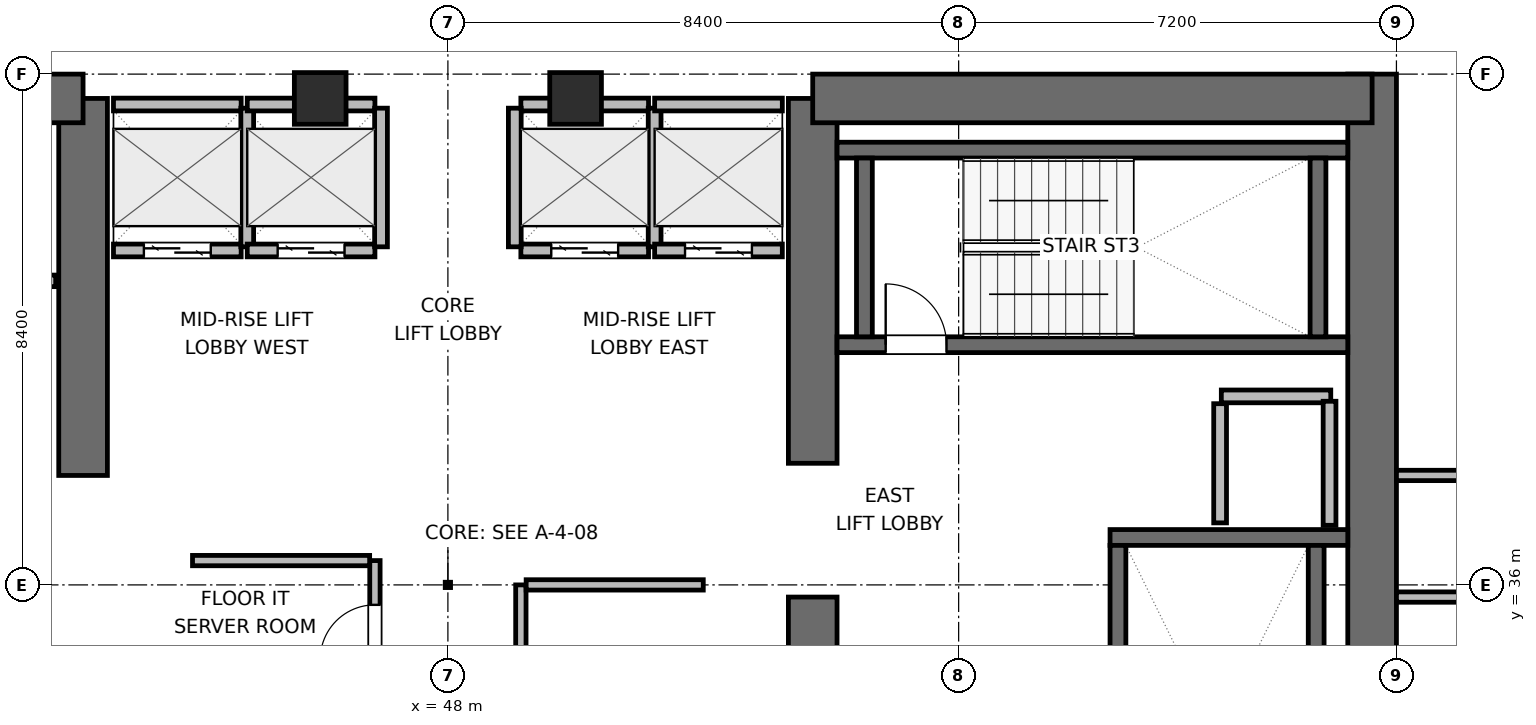
"""IFC4 building model, lengths in metres.
Left out: names, types, materials, properties, quantities, classifications, styles, units other than length and angle.
Written with IfcOpenShell. Run it as: python <this file> out.ifc"""

import sys

from ifc_helpers import new_model, si_unit, direction, frame, frame_2d, origin, origin_2d, place, context, subcontext, project, spatial, rectangle, extrude, element, fill, save


model = new_model("IFC4")
c1 = context("Model", 3, precision=1e-05, world=origin(), true_north=direction((0.0, 1.0)))
c2 = subcontext(c1, "Body", "Model", "MODEL_VIEW")
j1 = project(units=[si_unit("LENGTHUNIT", "METRE"), si_unit("PLANEANGLEUNIT", "RADIAN")], contexts=[c1])
p1 = place(None, origin())
s1 = spatial("IfcSite", under=j1, at=p1, CompositionType="ELEMENT")
p2 = place(p1, origin())
s2 = spatial("IfcBuilding", under=s1, at=p2, CompositionType="ELEMENT")
p3 = place(p2, frame((0.0, 0.0, 166.2)))
s3 = spatial("IfcBuildingStorey", under=s2, at=p3, CompositionType="ELEMENT", Elevation=166.2)
p4 = place(p3, frame((42.0, 37.8, 0.0), z_axis=(0.0, 0.0, 1.0), x_axis=(0.0, 1.0, 0.0)))
e1 = element("IfcWall", 1, at=p4, inside=s3, PredefinedType="SHEAR", context=c2, shape_type="SweptSolid", body=[
    extrude(rectangle(XDim=6.2, YDim=0.8, at=frame_2d((3.1, 0.0))), origin(), (0.0, 0.0, 1.0), 3.9),
])
p5 = place(p3, frame((32.8, 44.0, 0.0), z_axis=(0.0, 0.0, 1.0), x_axis=(1.0, 0.0, 0.0)))
e2 = element("IfcWall", 2, at=p5, inside=s3, PredefinedType="SHEAR", context=c2, shape_type="SweptSolid", body=[
    extrude(rectangle(XDim=9.2, YDim=0.8, at=frame_2d((4.6, 0.0))), origin(), (0.0, 0.0, 1.0), 3.9),
])
p6 = place(p5, frame((1.025, 0.0, 0.0)))
e3 = element("IfcOpeningElement", 3, at=p6, cuts=e2, PredefinedType="OPENING", context=c2, shape_type="SweptSolid", body=[
    extrude(rectangle(XDim=0.95, YDim=2.04, at=frame_2d((0.475, 1.02))), frame((0.0, 0.41, 0.0), z_axis=(0.0, -1.0, 0.0), x_axis=(1.0, 0.0, 0.0)), (0.0, 0.0, 1.0), 0.82),
])
p7 = place(p5, frame((4.275, 0.0, 0.0)))
e4 = element("IfcOpeningElement", 4, at=p7, cuts=e2, PredefinedType="OPENING", context=c2, shape_type="SweptSolid", body=[
    extrude(rectangle(XDim=0.9, YDim=2.02, at=frame_2d((0.45, 1.01))), frame((0.0, 0.41, 0.0), z_axis=(0.0, -1.0, 0.0), x_axis=(1.0, 0.0, 0.0)), (0.0, 0.0, 1.0), 0.82),
])
p8 = place(p5, frame((7.175, 0.0, 0.0)))
e5 = element("IfcOpeningElement", 5, at=p8, cuts=e2, PredefinedType="OPENING", context=c2, shape_type="SweptSolid", body=[
    extrude(rectangle(XDim=0.9, YDim=2.02, at=frame_2d((0.45, 1.01))), frame((0.0, 0.41, 0.0), z_axis=(0.0, -1.0, 0.0), x_axis=(1.0, 0.0, 0.0)), (0.0, 0.0, 1.0), 0.82),
])
p9 = place(p3, frame((54.0, 28.0, 0.0), z_axis=(0.0, 0.0, 1.0), x_axis=(0.0, 1.0, 0.0)))
e6 = element("IfcWall", 6, at=p9, inside=s3, PredefinedType="SHEAR", context=c2, shape_type="SweptSolid", body=[
    extrude(rectangle(XDim=7.8, YDim=0.8, at=frame_2d((3.9, 0.0))), origin(), (0.0, 0.0, 1.0), 3.9),
])
p10 = place(p3, frame((54.0, 38.0, 0.0), z_axis=(0.0, 0.0, 1.0), x_axis=(0.0, 1.0, 0.0)))
e7 = element("IfcWall", 7, at=p10, inside=s3, PredefinedType="SHEAR", context=c2, shape_type="SweptSolid", body=[
    extrude(rectangle(XDim=6.0, YDim=0.8, at=frame_2d((3.0, 0.0))), origin(), (0.0, 0.0, 1.0), 3.9),
])
p11 = place(p3, frame((63.2, 27.6, 0.0), z_axis=(0.0, 0.0, 1.0), x_axis=(0.0, 1.0, 0.0)))
e8 = element("IfcWall", 8, at=p11, inside=s3, PredefinedType="SHEAR", context=c2, shape_type="SweptSolid", body=[
    extrude(rectangle(XDim=16.8, YDim=0.8, at=frame_2d((8.4, 0.0))), origin(), (0.0, 0.0, 1.0), 3.9),
])
p12 = place(p3, frame((54.0, 44.0, 0.0), z_axis=(0.0, 0.0, 1.0), x_axis=(1.0, 0.0, 0.0)))
e9 = element("IfcWall", 9, at=p12, inside=s3, PredefinedType="SHEAR", context=c2, shape_type="SweptSolid", body=[
    extrude(rectangle(XDim=9.2, YDim=0.8, at=frame_2d((4.6, 0.0))), origin(), (0.0, 0.0, 1.0), 3.9),
])
p13 = place(p3, frame((58.89, 36.78, 0.0), z_axis=(0.0, 0.0, 1.0), x_axis=(1.0, 0.0, 0.0)))
e10 = element("IfcWall", 10, at=p13, inside=s3, PredefinedType="SHEAR", context=c2, shape_type="SweptSolid", body=[
    extrude(rectangle(XDim=3.91, YDim=0.26, at=frame_2d((1.955, 0.0))), origin(), (0.0, 0.0, 1.0), 3.9),
])
p14 = place(p3, frame((59.02, 29.05, 0.0), z_axis=(0.0, 0.0, 1.0), x_axis=(0.0, 1.0, 0.0)))
e11 = element("IfcWall", 11, at=p14, inside=s3, PredefinedType="SHEAR", context=c2, shape_type="SweptSolid", body=[
    extrude(rectangle(XDim=7.6, YDim=0.26, at=frame_2d((3.8, 0.0))), origin(), (0.0, 0.0, 1.0), 3.9),
])
p15 = place(p14, frame((0.3, 0.0, 0.0)))
e12 = element("IfcOpeningElement", 12, at=p15, cuts=e11, PredefinedType="OPENING", context=c2, shape_type="SweptSolid", body=[
    extrude(rectangle(XDim=1.0, YDim=2.04, at=frame_2d((0.5, 1.02))), frame((0.0, 0.14, 0.0), z_axis=(0.0, -1.0, 0.0), x_axis=(1.0, 0.0, 0.0)), (0.0, 0.0, 1.0), 0.28),
])
p16 = place(p3, frame((62.28, 29.05, 0.0), z_axis=(0.0, 0.0, 1.0), x_axis=(0.0, 1.0, 0.0)))
e13 = element("IfcWall", 13, at=p16, inside=s3, PredefinedType="SHEAR", context=c2, shape_type="SweptSolid", body=[
    extrude(rectangle(XDim=7.6, YDim=0.26, at=frame_2d((3.8, 0.0))), origin(), (0.0, 0.0, 1.0), 3.9),
])
p17 = place(p3, frame((54.4, 39.95, 0.0), z_axis=(0.0, 0.0, 1.0), x_axis=(1.0, 0.0, 0.0)))
e14 = element("IfcWall", 14, at=p17, inside=s3, PredefinedType="SHEAR", context=c2, shape_type="SweptSolid", body=[
    extrude(rectangle(XDim=8.4, YDim=0.26, at=frame_2d((4.2, 0.0))), origin(), (0.0, 0.0, 1.0), 3.9),
])
p18 = place(p17, frame((0.8, 0.0, 0.0)))
e15 = element("IfcOpeningElement", 15, at=p18, cuts=e14, PredefinedType="OPENING", context=c2, shape_type="SweptSolid", body=[
    extrude(rectangle(XDim=1.0, YDim=2.04, at=frame_2d((0.5, 1.02))), frame((0.0, 0.14, 0.0), z_axis=(0.0, -1.0, 0.0), x_axis=(1.0, 0.0, 0.0)), (0.0, 0.0, 1.0), 0.28),
])
p19 = place(p3, frame((54.4, 43.15, 0.0), z_axis=(0.0, 0.0, 1.0), x_axis=(1.0, 0.0, 0.0)))
e16 = element("IfcWall", 16, at=p19, inside=s3, PredefinedType="SHEAR", context=c2, shape_type="SweptSolid", body=[
    extrude(rectangle(XDim=8.4, YDim=0.26, at=frame_2d((4.2, 0.0))), origin(), (0.0, 0.0, 1.0), 3.9),
])
for number, where, z_axis, x_axis in (
    (17, (54.85, 40.08, 0.0), (0.0, 0.0, 1.0), (0.0, 1.0, 0.0)),
    (18, (62.31, 40.08, 0.0), (0.0, 0.0, 1.0), (0.0, 1.0, 0.0)),
):
    element("IfcWall", number, at=place(p3, frame(where, z_axis=z_axis, x_axis=x_axis)), inside=s3, PredefinedType="SHEAR", context=c2, shape_type="SweptSolid", body=[
        extrude(rectangle(XDim=2.94, YDim=0.26, at=frame_2d((1.47, 0.0))), origin(), (0.0, 0.0, 1.0), 3.9),
    ])
for number, where, z_axis, x_axis in (
    (19, (45.9, 44.0, 0.0), (0.0, 0.0, 1.0), (1.0, 0.0, 0.0)),
    (20, (50.1, 44.0, 0.0), (0.0, 0.0, 1.0), (1.0, 0.0, 0.0)),
):
    element("IfcColumn", number, at=place(p3, frame(where, z_axis=z_axis, x_axis=x_axis)), inside=s3, PredefinedType="COLUMN", context=c2, shape_type="SweptSolid", body=[
        extrude(rectangle(XDim=0.85, YDim=0.85, at=origin_2d()), origin(), (0.0, 0.0, 1.0), 3.9),
    ])
p20 = place(p3, frame((33.25, 41.0, 0.0), z_axis=(0.0, 0.0, 1.0), x_axis=(1.0, 0.0, 0.0)))
e21 = element("IfcWall", 21, at=p20, inside=s3, PredefinedType="PLUMBINGWALL", context=c2, shape_type="SweptSolid", body=[
    extrude(rectangle(XDim=8.3, YDim=0.19, at=frame_2d((4.15, 0.0))), origin(), (0.0, 0.0, 1.0), 3.68),
])
p21 = place(p3, frame((60.72, 39.1, 0.0), z_axis=(0.0, 0.0, 1.0), x_axis=(1.0, 0.0, 0.0)))
e22 = element("IfcWall", 22, at=p21, inside=s3, PredefinedType="PARTITIONING", context=c2, shape_type="SweptSolid", body=[
    extrude(rectangle(XDim=1.8, YDim=0.21, at=frame_2d((0.9, 0.0))), origin(), (0.0, 0.0, 1.0), 3.68),
])
p22 = place(p3, frame((60.7, 37.02, 0.0), z_axis=(0.0, 0.0, 1.0), x_axis=(0.0, 1.0, 0.0)))
e23 = element("IfcWall", 23, at=p22, inside=s3, PredefinedType="PARTITIONING", context=c2, shape_type="SweptSolid", body=[
    extrude(rectangle(XDim=1.96, YDim=0.21, at=frame_2d((0.98, 0.0))), origin(), (0.0, 0.0, 1.0), 3.68),
])
p23 = place(p3, frame((62.5, 36.98, 0.0), z_axis=(0.0, 0.0, 1.0), x_axis=(0.0, 1.0, 0.0)))
e24 = element("IfcWall", 24, at=p23, inside=s3, PredefinedType="PARTITIONING", context=c2, shape_type="SweptSolid", body=[
    extrude(rectangle(XDim=2.04, YDim=0.21, at=frame_2d((1.02, 0.0))), origin(), (0.0, 0.0, 1.0), 3.68),
])
p24 = place(p3, frame((42.5, 41.5, 0.0), z_axis=(0.0, 0.0, 1.0), x_axis=(1.0, 0.0, 0.0)))
e25 = element("IfcWall", 25, at=p24, inside=s3, PredefinedType="PARTITIONING", context=c2, shape_type="SweptSolid", body=[
    extrude(rectangle(XDim=2.1, YDim=0.21, at=frame_2d((1.05, 0.0))), origin(), (0.0, 0.0, 1.0), 3.68),
])
p25 = place(p24, frame((0.5, 0.0, 0.0)))
e26 = element("IfcOpeningElement", 26, at=p25, cuts=e25, PredefinedType="OPENING", context=c2, shape_type="SweptSolid", body=[
    extrude(rectangle(XDim=1.1, YDim=2.04, at=frame_2d((0.55, 1.02))), frame((0.0, 0.115, 0.0), z_axis=(0.0, -1.0, 0.0), x_axis=(1.0, 0.0, 0.0)), (0.0, 0.0, 1.0), 0.23),
])
p26 = place(p3, frame((42.5, 43.9, 0.0), z_axis=(0.0, 0.0, 1.0), x_axis=(1.0, 0.0, 0.0)))
e27 = element("IfcWall", 27, at=p26, inside=s3, PredefinedType="PARTITIONING", context=c2, shape_type="SweptSolid", body=[
    extrude(rectangle(XDim=2.1, YDim=0.21, at=frame_2d((1.05, 0.0))), origin(), (0.0, 0.0, 1.0), 2.765),
])
p27 = place(p3, frame((44.7, 41.56, 0.0), z_axis=(0.0, 0.0, 1.0), x_axis=(0.0, 1.0, 0.0)))
e28 = element("IfcWall", 28, at=p27, inside=s3, PredefinedType="PARTITIONING", context=c2, shape_type="SweptSolid", body=[
    extrude(rectangle(XDim=2.28, YDim=0.21, at=frame_2d((1.14, 0.0))), origin(), (0.0, 0.0, 1.0), 3.68),
])
p28 = place(p3, frame((44.7, 41.5, 0.0), z_axis=(0.0, 0.0, 1.0), x_axis=(1.0, 0.0, 0.0)))
e29 = element("IfcWall", 29, at=p28, inside=s3, PredefinedType="PARTITIONING", context=c2, shape_type="SweptSolid", body=[
    extrude(rectangle(XDim=2.1, YDim=0.21, at=frame_2d((1.05, 0.0))), origin(), (0.0, 0.0, 1.0), 3.68),
])
p29 = place(p28, frame((0.5, 0.0, 0.0)))
e30 = element("IfcOpeningElement", 30, at=p29, cuts=e29, PredefinedType="OPENING", context=c2, shape_type="SweptSolid", body=[
    extrude(rectangle(XDim=1.1, YDim=2.04, at=frame_2d((0.55, 1.02))), frame((0.0, 0.115, 0.0), z_axis=(0.0, -1.0, 0.0), x_axis=(1.0, 0.0, 0.0)), (0.0, 0.0, 1.0), 0.23),
])
p30 = place(p3, frame((44.7, 43.9, 0.0), z_axis=(0.0, 0.0, 1.0), x_axis=(1.0, 0.0, 0.0)))
e31 = element("IfcWall", 31, at=p30, inside=s3, PredefinedType="PARTITIONING", context=c2, shape_type="SweptSolid", body=[
    extrude(rectangle(XDim=2.1, YDim=0.21, at=frame_2d((1.05, 0.0))), origin(), (0.0, 0.0, 1.0), 2.765),
])
p31 = place(p3, frame((46.9, 41.56, 0.0), z_axis=(0.0, 0.0, 1.0), x_axis=(0.0, 1.0, 0.0)))
e32 = element("IfcWall", 32, at=p31, inside=s3, PredefinedType="PARTITIONING", context=c2, shape_type="SweptSolid", body=[
    extrude(rectangle(XDim=2.28, YDim=0.21, at=frame_2d((1.14, 0.0))), origin(), (0.0, 0.0, 1.0), 3.68),
])
p32 = place(p3, frame((49.2, 41.5, 0.0), z_axis=(0.0, 0.0, 1.0), x_axis=(1.0, 0.0, 0.0)))
e33 = element("IfcWall", 33, at=p32, inside=s3, PredefinedType="PARTITIONING", context=c2, shape_type="SweptSolid", body=[
    extrude(rectangle(XDim=2.1, YDim=0.21, at=frame_2d((1.05, 0.0))), origin(), (0.0, 0.0, 1.0), 3.68),
])
p33 = place(p32, frame((0.5, 0.0, 0.0)))
e34 = element("IfcOpeningElement", 34, at=p33, cuts=e33, PredefinedType="OPENING", context=c2, shape_type="SweptSolid", body=[
    extrude(rectangle(XDim=1.1, YDim=2.04, at=frame_2d((0.55, 1.02))), frame((0.0, 0.115, 0.0), z_axis=(0.0, -1.0, 0.0), x_axis=(1.0, 0.0, 0.0)), (0.0, 0.0, 1.0), 0.23),
])
p34 = place(p3, frame((49.2, 43.9, 0.0), z_axis=(0.0, 0.0, 1.0), x_axis=(1.0, 0.0, 0.0)))
e35 = element("IfcWall", 35, at=p34, inside=s3, PredefinedType="PARTITIONING", context=c2, shape_type="SweptSolid", body=[
    extrude(rectangle(XDim=2.1, YDim=0.21, at=frame_2d((1.05, 0.0))), origin(), (0.0, 0.0, 1.0), 2.765),
])
for number, where, z_axis, x_axis in (
    (36, (49.1, 41.56, 0.0), (0.0, 0.0, 1.0), (0.0, 1.0, 0.0)),
    (37, (51.4, 41.56, 0.0), (0.0, 0.0, 1.0), (0.0, 1.0, 0.0)),
):
    element("IfcWall", number, at=place(p3, frame(where, z_axis=z_axis, x_axis=x_axis)), inside=s3, PredefinedType="PARTITIONING", context=c2, shape_type="SweptSolid", body=[
        extrude(rectangle(XDim=2.28, YDim=0.21, at=frame_2d((1.14, 0.0))), origin(), (0.0, 0.0, 1.0), 3.68),
    ])
p35 = place(p3, frame((51.4, 41.5, 0.0), z_axis=(0.0, 0.0, 1.0), x_axis=(1.0, 0.0, 0.0)))
e38 = element("IfcWall", 38, at=p35, inside=s3, PredefinedType="PARTITIONING", context=c2, shape_type="SweptSolid", body=[
    extrude(rectangle(XDim=2.1, YDim=0.21, at=frame_2d((1.05, 0.0))), origin(), (0.0, 0.0, 1.0), 3.68),
])
p36 = place(p35, frame((0.5, 0.0, 0.0)))
e39 = element("IfcOpeningElement", 39, at=p36, cuts=e38, PredefinedType="OPENING", context=c2, shape_type="SweptSolid", body=[
    extrude(rectangle(XDim=1.1, YDim=2.04, at=frame_2d((0.55, 1.02))), frame((0.0, 0.115, 0.0), z_axis=(0.0, -1.0, 0.0), x_axis=(1.0, 0.0, 0.0)), (0.0, 0.0, 1.0), 0.23),
])
p37 = place(p3, frame((51.4, 43.9, 0.0), z_axis=(0.0, 0.0, 1.0), x_axis=(1.0, 0.0, 0.0)))
e40 = element("IfcWall", 40, at=p37, inside=s3, PredefinedType="PARTITIONING", context=c2, shape_type="SweptSolid", body=[
    extrude(rectangle(XDim=2.1, YDim=0.21, at=frame_2d((1.05, 0.0))), origin(), (0.0, 0.0, 1.0), 2.765),
])
p38 = place(p3, frame((46.8, 32.6, 0.0), z_axis=(0.0, 0.0, 1.0), x_axis=(0.0, 1.0, 0.0)))
e41 = element("IfcWall", 41, at=p38, inside=s3, PredefinedType="PARTITIONING", context=c2, shape_type="SweptSolid", body=[
    extrude(rectangle(XDim=3.8, YDim=0.17, at=frame_2d((1.9, 0.0))), origin(), (0.0, 0.0, 1.0), 3.68),
])
p39 = place(p38, frame((0.272, 0.0, 0.0)))
e42 = element("IfcOpeningElement", 42, at=p39, cuts=e41, PredefinedType="OPENING", context=c2, shape_type="SweptSolid", body=[
    extrude(rectangle(XDim=0.9, YDim=2.02, at=frame_2d((0.45, 1.01))), frame((0.0, 0.095, 0.0), z_axis=(0.0, -1.0, 0.0), x_axis=(1.0, 0.0, 0.0)), (0.0, 0.0, 1.0), 0.19),
])
p40 = place(p38, frame((2.172, 0.0, 0.0)))
e43 = element("IfcOpeningElement", 43, at=p40, cuts=e41, PredefinedType="OPENING", context=c2, shape_type="SweptSolid", body=[
    extrude(rectangle(XDim=0.9, YDim=2.02, at=frame_2d((0.45, 1.01))), frame((0.0, 0.095, 0.0), z_axis=(0.0, -1.0, 0.0), x_axis=(1.0, 0.0, 0.0)), (0.0, 0.0, 1.0), 0.19),
])
p41 = place(p3, frame((43.8, 36.4, 0.0), z_axis=(0.0, 0.0, 1.0), x_axis=(1.0, 0.0, 0.0)))
e44 = element("IfcWall", 44, at=p41, inside=s3, PredefinedType="PARTITIONING", context=c2, shape_type="SweptSolid", body=[
    extrude(rectangle(XDim=2.913, YDim=0.17, at=frame_2d((1.457, 0.0))), origin(), (0.0, 0.0, 1.0), 3.68),
])
p42 = place(p3, frame((49.2, 32.6, 0.0), z_axis=(0.0, 0.0, 1.0), x_axis=(0.0, 1.0, 0.0)))
e45 = element("IfcWall", 45, at=p42, inside=s3, PredefinedType="PARTITIONING", context=c2, shape_type="SweptSolid", body=[
    extrude(rectangle(XDim=3.4, YDim=0.17, at=frame_2d((1.7, 0.0))), origin(), (0.0, 0.0, 1.0), 3.68),
])
p43 = place(p42, frame((0.638, 0.0, 0.0)))
e46 = element("IfcOpeningElement", 46, at=p43, cuts=e45, PredefinedType="OPENING", context=c2, shape_type="SweptSolid", body=[
    extrude(rectangle(XDim=0.9, YDim=2.02, at=frame_2d((0.45, 1.01))), frame((0.0, 0.095, 0.0), z_axis=(0.0, -1.0, 0.0), x_axis=(1.0, 0.0, 0.0)), (0.0, 0.0, 1.0), 0.19),
])
p44 = place(p3, frame((49.287, 36.0, 0.0), z_axis=(0.0, 0.0, 1.0), x_axis=(1.0, 0.0, 0.0)))
e47 = element("IfcWall", 47, at=p44, inside=s3, PredefinedType="PARTITIONING", context=c2, shape_type="SweptSolid", body=[
    extrude(rectangle(XDim=2.913, YDim=0.17, at=frame_2d((1.457, 0.0))), origin(), (0.0, 0.0, 1.0), 3.68),
])
p45 = place(p3, frame((63.6, 35.8, 0.0), z_axis=(0.0, 0.0, 1.0), x_axis=(1.0, 0.0, 0.0)))
e48 = element("IfcWall", 48, at=p45, inside=s3, PredefinedType="PARTITIONING", context=c2, shape_type="SweptSolid", body=[
    extrude(rectangle(XDim=6.975, YDim=0.17, at=frame_2d((3.487, 0.0))), origin(), (0.0, 0.0, 1.0), 3.043),
])
p46 = place(p45, frame((1.1, 0.0, 0.0)))
e49 = element("IfcOpeningElement", 49, at=p46, cuts=e48, PredefinedType="OPENING", context=c2, shape_type="SweptSolid", body=[
    extrude(rectangle(XDim=0.95, YDim=2.04, at=frame_2d((0.475, 1.02))), frame((0.0, 0.095, 0.0), z_axis=(0.0, -1.0, 0.0), x_axis=(1.0, 0.0, 0.0)), (0.0, 0.0, 1.0), 0.19),
])
p47 = place(p3, frame((63.6, 37.8, 0.0), z_axis=(0.0, 0.0, 1.0), x_axis=(1.0, 0.0, 0.0)))
e50 = element("IfcWall", 50, at=p47, inside=s3, PredefinedType="PARTITIONING", context=c2, shape_type="SweptSolid", body=[
    extrude(rectangle(XDim=4.96, YDim=0.17, at=frame_2d((2.48, 0.0))), origin(), (0.0, 0.0, 1.0), 3.68),
])
p48 = place(p47, frame((1.1, 0.0, 0.0)))
e51 = element("IfcOpeningElement", 51, at=p48, cuts=e50, PredefinedType="OPENING", context=c2, shape_type="SweptSolid", body=[
    extrude(rectangle(XDim=0.95, YDim=2.04, at=frame_2d((0.475, 1.02))), frame((0.0, 0.095, 0.0), z_axis=(0.0, -1.0, 0.0), x_axis=(1.0, 0.0, 0.0)), (0.0, 0.0, 1.0), 0.19),
])
p49 = place(p18, origin())
e52 = element("IfcDoor", 52, at=p49, inside=s3, OperationType="SINGLE_SWING_LEFT", PredefinedType="DOOR", context=c2, shape_type="SweptSolid", body=[
    extrude(rectangle(XDim=1.0, YDim=2.04, at=frame_2d((0.5, 1.02))), frame((0.0, 0.025, 0.0), z_axis=(0.0, -1.0, 0.0), x_axis=(1.0, 0.0, 0.0)), (0.0, 0.0, 1.0), 0.05),
])
fill(e15, e52)
p50 = place(p25, origin())
e53 = element("IfcDoor", 53, at=p50, inside=s3, OperationType="DOUBLE_DOOR_SLIDING", PredefinedType="DOOR", context=c2, shape_type="SweptSolid", body=[
    extrude(rectangle(XDim=1.1, YDim=2.04, at=frame_2d((0.55, 1.02))), frame((0.0, 0.025, 0.0), z_axis=(0.0, -1.0, 0.0), x_axis=(1.0, 0.0, 0.0)), (0.0, 0.0, 1.0), 0.05),
])
fill(e26, e53)
p51 = place(p29, origin())
e54 = element("IfcDoor", 54, at=p51, inside=s3, OperationType="DOUBLE_DOOR_SLIDING", PredefinedType="DOOR", context=c2, shape_type="SweptSolid", body=[
    extrude(rectangle(XDim=1.1, YDim=2.04, at=frame_2d((0.55, 1.02))), frame((0.0, 0.025, 0.0), z_axis=(0.0, -1.0, 0.0), x_axis=(1.0, 0.0, 0.0)), (0.0, 0.0, 1.0), 0.05),
])
fill(e30, e54)
p52 = place(p33, origin())
e55 = element("IfcDoor", 55, at=p52, inside=s3, OperationType="DOUBLE_DOOR_SLIDING", PredefinedType="DOOR", context=c2, shape_type="SweptSolid", body=[
    extrude(rectangle(XDim=1.1, YDim=2.04, at=frame_2d((0.55, 1.02))), frame((0.0, 0.025, 0.0), z_axis=(0.0, -1.0, 0.0), x_axis=(1.0, 0.0, 0.0)), (0.0, 0.0, 1.0), 0.05),
])
fill(e34, e55)
p53 = place(p36, origin())
e56 = element("IfcDoor", 56, at=p53, inside=s3, OperationType="DOUBLE_DOOR_SLIDING", PredefinedType="DOOR", context=c2, shape_type="SweptSolid", body=[
    extrude(rectangle(XDim=1.1, YDim=2.04, at=frame_2d((0.55, 1.02))), frame((0.0, 0.025, 0.0), z_axis=(0.0, -1.0, 0.0), x_axis=(1.0, 0.0, 0.0)), (0.0, 0.0, 1.0), 0.05),
])
fill(e39, e56)
p54 = place(p40, origin())
e57 = element("IfcDoor", 57, at=p54, inside=s3, OperationType="SINGLE_SWING_LEFT", PredefinedType="DOOR", context=c2, shape_type="SweptSolid", body=[
    extrude(rectangle(XDim=0.9, YDim=2.02, at=frame_2d((0.45, 1.01))), frame((0.0, 0.025, 0.0), z_axis=(0.0, -1.0, 0.0), x_axis=(1.0, 0.0, 0.0)), (0.0, 0.0, 1.0), 0.05),
])
fill(e43, e57)
save(model, sys.argv[1])
